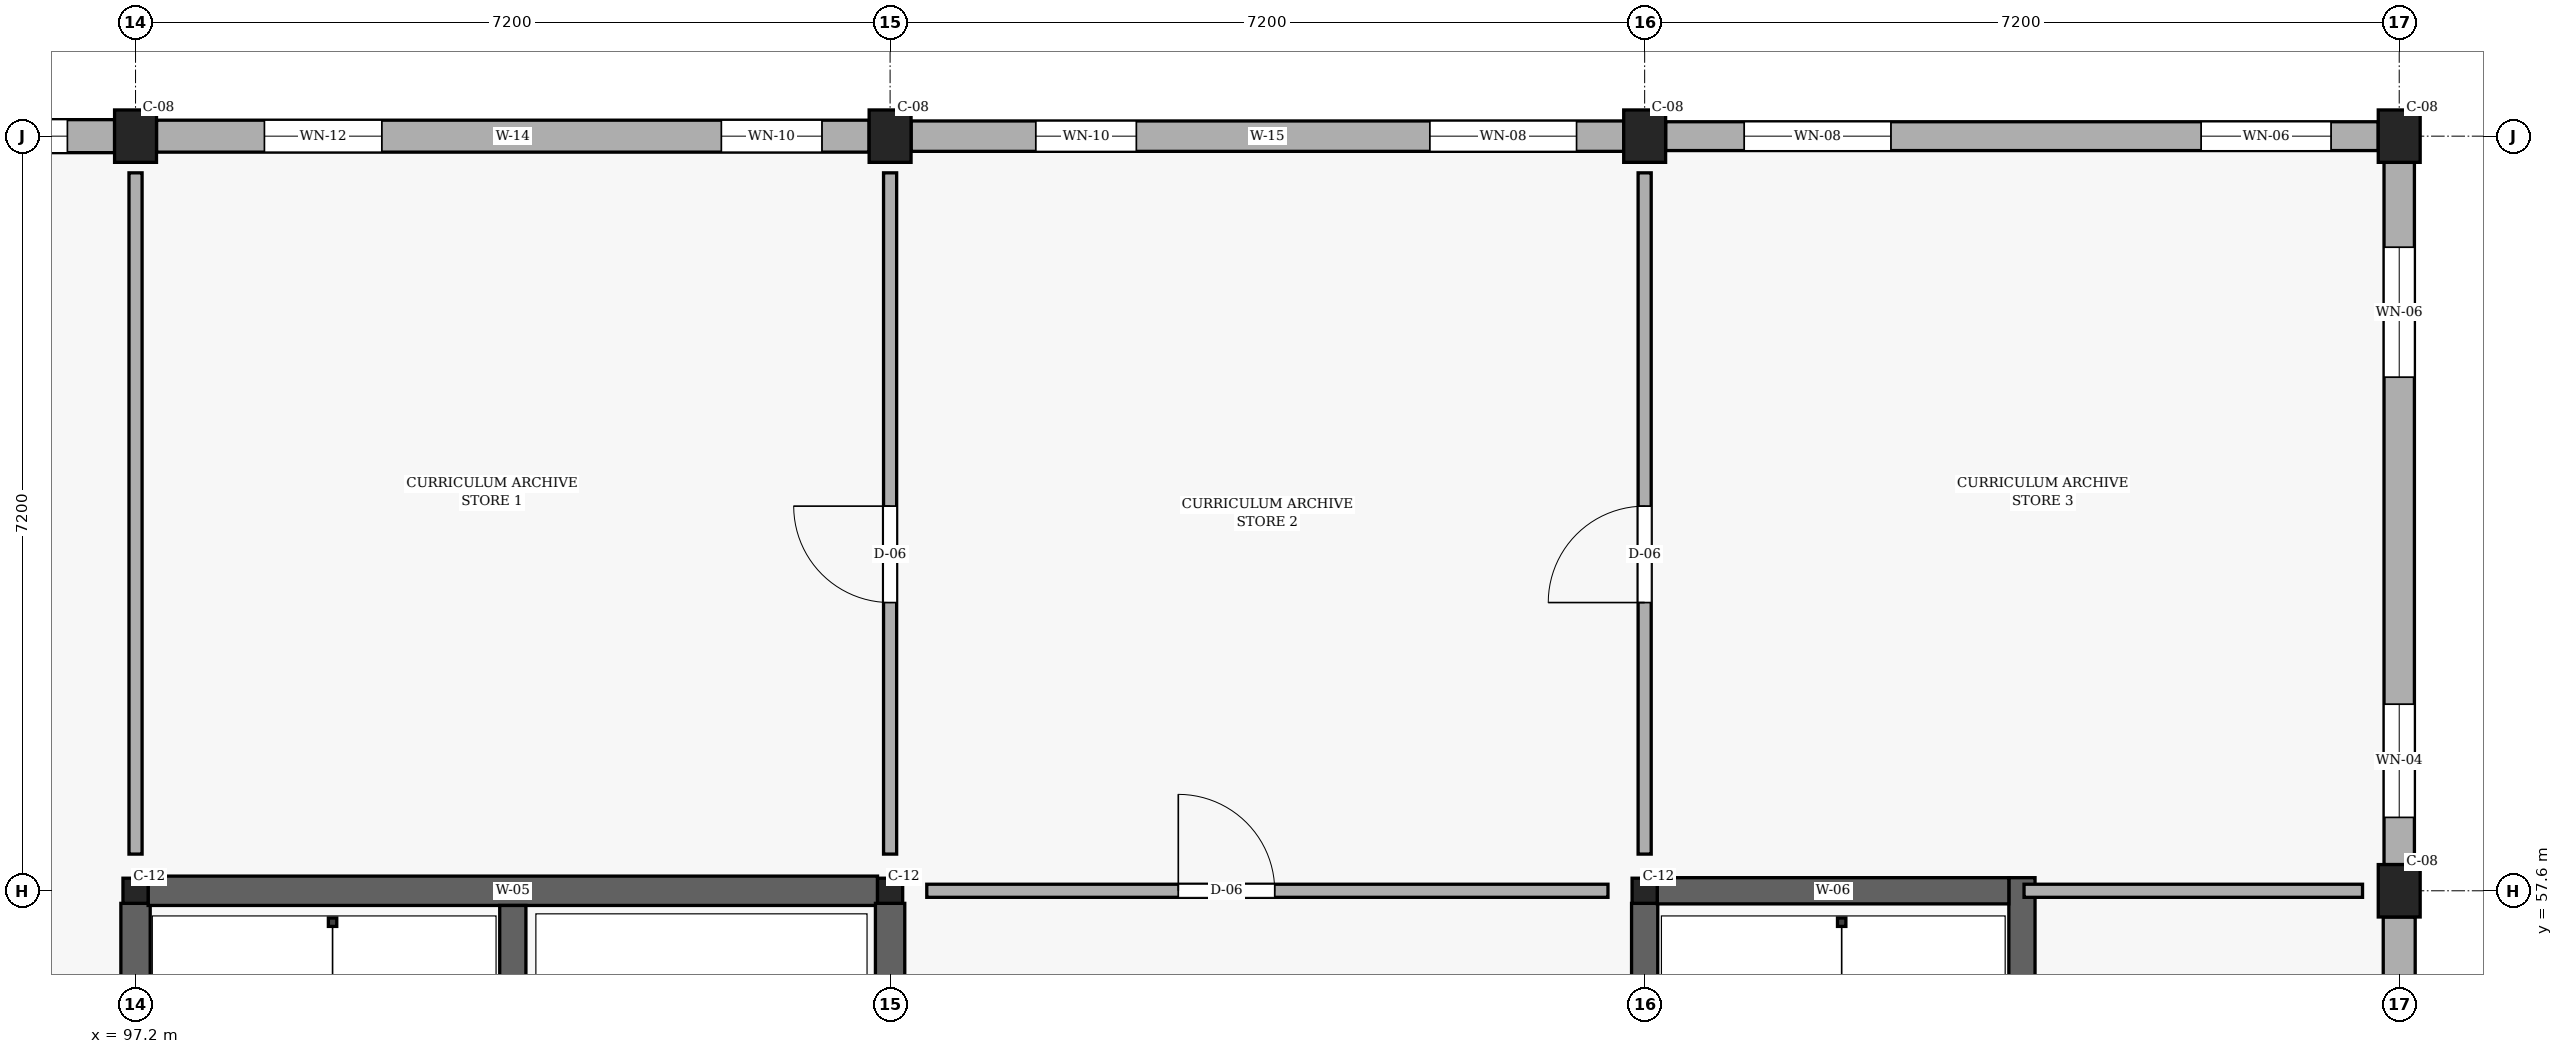
"""IFC4 building model, lengths in metres.
Left out: names, types, materials, properties, quantities, classifications, styles, units other than length and angle.
Written with IfcOpenShell. Run it as: python <this file> out.ifc"""

import sys

from ifc_helpers import new_model, si_unit, direction, frame, frame_2d, origin, origin_2d, place, context, subcontext, project, spatial, rectangle, i_section, extrude, element, fill, save


model = new_model("IFC4")
c1 = context("Model", 3, precision=1e-05, world=origin(), true_north=direction((0.0, 1.0)))
c2 = subcontext(c1, "Body", "Model", "MODEL_VIEW")
j1 = project(units=[si_unit("LENGTHUNIT", "METRE"), si_unit("PLANEANGLEUNIT", "RADIAN")], contexts=[c1])
p1 = place(None, origin())
s1 = spatial("IfcSite", under=j1, at=p1, CompositionType="ELEMENT")
p2 = place(p1, origin())
s2 = spatial("IfcBuilding", under=s1, at=p2, CompositionType="ELEMENT")
p3 = place(p2, frame((0.0, 0.0, 4.5)))
s3 = spatial("IfcBuildingStorey", under=s2, at=p3, CompositionType="ELEMENT", Elevation=4.5)
p4 = place(p3, frame((97.2, 57.6, 0.0), z_axis=(0.0, 0.0, 1.0), x_axis=(1.0, 0.0, 0.0)))
e1 = element("IfcColumn", 1, at=p4, inside=s3, PredefinedType="COLUMN", context=c2, shape_type="SweptSolid", body=[
    extrude(i_section(OverallWidth=0.24, OverallDepth=0.24, WebThickness=0.01, FlangeThickness=0.017, FilletRadius=0.021, at=origin_2d()), origin(), (0.0, 0.0, 1.0), 3.15),
])
p5 = place(p3, frame((97.2, 64.8, 0.0), z_axis=(0.0, 0.0, 1.0), x_axis=(1.0, 0.0, 0.0)))
e2 = element("IfcColumn", 2, at=p5, inside=s3, PredefinedType="COLUMN", context=c2, shape_type="SweptSolid", body=[
    extrude(rectangle(XDim=0.4, YDim=0.5, at=origin_2d()), origin(), (0.0, 0.0, 1.0), 3.15),
])
p6 = place(p3, frame((104.4, 57.6, 0.0), z_axis=(0.0, 0.0, 1.0), x_axis=(1.0, 0.0, 0.0)))
e3 = element("IfcColumn", 3, at=p6, inside=s3, PredefinedType="COLUMN", context=c2, shape_type="SweptSolid", body=[
    extrude(i_section(OverallWidth=0.24, OverallDepth=0.24, WebThickness=0.01, FlangeThickness=0.017, FilletRadius=0.021, at=origin_2d()), origin(), (0.0, 0.0, 1.0), 3.15),
])
p7 = place(p3, frame((104.4, 64.8, 0.0), z_axis=(0.0, 0.0, 1.0), x_axis=(1.0, 0.0, 0.0)))
e4 = element("IfcColumn", 4, at=p7, inside=s3, PredefinedType="COLUMN", context=c2, shape_type="SweptSolid", body=[
    extrude(rectangle(XDim=0.4, YDim=0.5, at=origin_2d()), origin(), (0.0, 0.0, 1.0), 3.15),
])
p8 = place(p3, frame((111.6, 57.6, 0.0), z_axis=(0.0, 0.0, 1.0), x_axis=(1.0, 0.0, 0.0)))
e5 = element("IfcColumn", 5, at=p8, inside=s3, PredefinedType="COLUMN", context=c2, shape_type="SweptSolid", body=[
    extrude(i_section(OverallWidth=0.24, OverallDepth=0.24, WebThickness=0.01, FlangeThickness=0.017, FilletRadius=0.021, at=origin_2d()), origin(), (0.0, 0.0, 1.0), 3.15),
])
for number, where, z_axis, x_axis in (
    (6, (111.6, 64.8, 0.0), (0.0, 0.0, 1.0), (1.0, 0.0, 0.0)),
    (7, (118.8, 57.6, 0.0), (0.0, 0.0, 1.0), (1.0, 0.0, 0.0)),
    (8, (118.8, 64.8, 0.0), (0.0, 0.0, 1.0), (1.0, 0.0, 0.0)),
):
    element("IfcColumn", number, at=place(p3, frame(where, z_axis=z_axis, x_axis=x_axis)), inside=s3, PredefinedType="COLUMN", context=c2, shape_type="SweptSolid", body=[
        extrude(rectangle(XDim=0.4, YDim=0.5, at=origin_2d()), origin(), (0.0, 0.0, 1.0), 3.15),
    ])
p9 = place(p3, frame((118.8, 50.65, 0.0), z_axis=(0.0, 0.0, 1.0), x_axis=(0.0, 1.0, 0.0)))
e9 = element("IfcWall", 9, at=p9, inside=s3, PredefinedType="SOLIDWALL", context=c2, shape_type="SweptSolid", body=[
    extrude(rectangle(XDim=6.7, YDim=0.305, at=frame_2d((3.35, 0.0))), origin(), (0.0, 0.0, 1.0), 2.34),
])
p10 = place(p9, frame((0.45, 0.0, 0.78)))
e10 = element("IfcOpeningElement", 10, at=p10, cuts=e9, PredefinedType="OPENING", context=c2, shape_type="SweptSolid", body=[
    extrude(rectangle(XDim=0.92, YDim=1.15, at=frame_2d((0.46, 0.575))), frame((0.0, 0.163, 0.0), z_axis=(0.0, -1.0, 0.0), x_axis=(1.0, 0.0, 0.0)), (0.0, 0.0, 1.0), 0.325),
])
p11 = place(p9, frame((4.65, 0.0, 0.78)))
e11 = element("IfcOpeningElement", 11, at=p11, cuts=e9, PredefinedType="OPENING", context=c2, shape_type="SweptSolid", body=[
    extrude(rectangle(XDim=1.08, YDim=1.15, at=frame_2d((0.54, 0.575))), frame((0.0, 0.163, 0.0), z_axis=(0.0, -1.0, 0.0), x_axis=(1.0, 0.0, 0.0)), (0.0, 0.0, 1.0), 0.325),
])
p12 = place(p3, frame((118.8, 57.85, 0.0), z_axis=(0.0, 0.0, 1.0), x_axis=(0.0, 1.0, 0.0)))
e12 = element("IfcWall", 12, at=p12, inside=s3, PredefinedType="SOLIDWALL", context=c2, shape_type="SweptSolid", body=[
    extrude(rectangle(XDim=6.7, YDim=0.29, at=frame_2d((3.35, 0.0))), origin(), (0.0, 0.0, 1.0), 2.34),
])
p13 = place(p12, frame((0.45, 0.0, 0.78)))
e13 = element("IfcOpeningElement", 13, at=p13, cuts=e12, PredefinedType="OPENING", context=c2, shape_type="SweptSolid", body=[
    extrude(rectangle(XDim=1.08, YDim=1.15, at=frame_2d((0.54, 0.575))), frame((0.0, 0.155, 0.0), z_axis=(0.0, -1.0, 0.0), x_axis=(1.0, 0.0, 0.0)), (0.0, 0.0, 1.0), 0.31),
])
p14 = place(p12, frame((4.65, 0.0, 0.78)))
e14 = element("IfcOpeningElement", 14, at=p14, cuts=e12, PredefinedType="OPENING", context=c2, shape_type="SweptSolid", body=[
    extrude(rectangle(XDim=1.24, YDim=1.15, at=frame_2d((0.62, 0.575))), frame((0.0, 0.155, 0.0), z_axis=(0.0, -1.0, 0.0), x_axis=(1.0, 0.0, 0.0)), (0.0, 0.0, 1.0), 0.31),
])
p15 = place(p3, frame((118.6, 64.8, 0.0), z_axis=(0.0, 0.0, 1.0), x_axis=(-1.0, 0.0, 0.0)))
e15 = element("IfcWall", 15, at=p15, inside=s3, PredefinedType="SOLIDWALL", context=c2, shape_type="SweptSolid", body=[
    extrude(rectangle(XDim=6.8, YDim=0.275, at=frame_2d((3.4, 0.0))), origin(), (0.0, 0.0, 1.0), 2.34),
])
p16 = place(p15, frame((0.45, 0.0, 0.78)))
e16 = element("IfcOpeningElement", 16, at=p16, cuts=e15, PredefinedType="OPENING", context=c2, shape_type="SweptSolid", body=[
    extrude(rectangle(XDim=1.24, YDim=1.15, at=frame_2d((0.62, 0.575))), frame((0.0, 0.147, 0.0), z_axis=(0.0, -1.0, 0.0), x_axis=(1.0, 0.0, 0.0)), (0.0, 0.0, 1.0), 0.295),
])
p17 = place(p15, frame((4.65, 0.0, 0.78)))
e17 = element("IfcOpeningElement", 17, at=p17, cuts=e15, PredefinedType="OPENING", context=c2, shape_type="SweptSolid", body=[
    extrude(rectangle(XDim=1.4, YDim=1.15, at=frame_2d((0.7, 0.575))), frame((0.0, 0.147, 0.0), z_axis=(0.0, -1.0, 0.0), x_axis=(1.0, 0.0, 0.0)), (0.0, 0.0, 1.0), 0.295),
])
p18 = place(p3, frame((111.4, 64.8, 0.0), z_axis=(0.0, 0.0, 1.0), x_axis=(-1.0, 0.0, 0.0)))
e18 = element("IfcWall", 18, at=p18, inside=s3, PredefinedType="SOLIDWALL", context=c2, shape_type="SweptSolid", body=[
    extrude(rectangle(XDim=6.8, YDim=0.29, at=frame_2d((3.4, 0.0))), origin(), (0.0, 0.0, 1.0), 2.34),
])
p19 = place(p18, frame((0.45, 0.0, 0.78)))
e19 = element("IfcOpeningElement", 19, at=p19, cuts=e18, PredefinedType="OPENING", context=c2, shape_type="SweptSolid", body=[
    extrude(rectangle(XDim=1.4, YDim=1.15, at=frame_2d((0.7, 0.575))), frame((0.0, 0.155, 0.0), z_axis=(0.0, -1.0, 0.0), x_axis=(1.0, 0.0, 0.0)), (0.0, 0.0, 1.0), 0.31),
])
p20 = place(p18, frame((4.65, 0.0, 0.78)))
e20 = element("IfcOpeningElement", 20, at=p20, cuts=e18, PredefinedType="OPENING", context=c2, shape_type="SweptSolid", body=[
    extrude(rectangle(XDim=0.96, YDim=1.26, at=frame_2d((0.48, 0.63))), frame((0.0, 0.155, 0.0), z_axis=(0.0, -1.0, 0.0), x_axis=(1.0, 0.0, 0.0)), (0.0, 0.0, 1.0), 0.31),
])
p21 = place(p3, frame((104.2, 64.8, 0.0), z_axis=(0.0, 0.0, 1.0), x_axis=(-1.0, 0.0, 0.0)))
e21 = element("IfcWall", 21, at=p21, inside=s3, PredefinedType="SOLIDWALL", context=c2, shape_type="SweptSolid", body=[
    extrude(rectangle(XDim=6.8, YDim=0.305, at=frame_2d((3.4, 0.0))), origin(), (0.0, 0.0, 1.0), 2.34),
])
p22 = place(p21, frame((0.45, 0.0, 0.78)))
e22 = element("IfcOpeningElement", 22, at=p22, cuts=e21, PredefinedType="OPENING", context=c2, shape_type="SweptSolid", body=[
    extrude(rectangle(XDim=0.96, YDim=1.26, at=frame_2d((0.48, 0.63))), frame((0.0, 0.163, 0.0), z_axis=(0.0, -1.0, 0.0), x_axis=(1.0, 0.0, 0.0)), (0.0, 0.0, 1.0), 0.325),
])
p23 = place(p21, frame((4.65, 0.0, 0.78)))
e23 = element("IfcOpeningElement", 23, at=p23, cuts=e21, PredefinedType="OPENING", context=c2, shape_type="SweptSolid", body=[
    extrude(rectangle(XDim=1.12, YDim=1.26, at=frame_2d((0.56, 0.63))), frame((0.0, 0.163, 0.0), z_axis=(0.0, -1.0, 0.0), x_axis=(1.0, 0.0, 0.0)), (0.0, 0.0, 1.0), 0.325),
])
p24 = place(p3, frame((97.0, 64.8, 0.0), z_axis=(0.0, 0.0, 1.0), x_axis=(-1.0, 0.0, 0.0)))
e24 = element("IfcWall", 24, at=p24, inside=s3, PredefinedType="SOLIDWALL", context=c2, shape_type="SweptSolid", body=[
    extrude(rectangle(XDim=6.8, YDim=0.315, at=frame_2d((3.4, 0.0))), origin(), (0.0, 0.0, 1.0), 2.34),
])
p25 = place(p24, frame((0.45, 0.0, 0.78)))
e25 = element("IfcOpeningElement", 25, at=p25, cuts=e24, PredefinedType="OPENING", context=c2, shape_type="SweptSolid", body=[
    extrude(rectangle(XDim=1.12, YDim=1.26, at=frame_2d((0.56, 0.63))), frame((0.0, 0.167, 0.0), z_axis=(0.0, -1.0, 0.0), x_axis=(1.0, 0.0, 0.0)), (0.0, 0.0, 1.0), 0.335),
])
p26 = place(p24, frame((4.65, 0.0, 0.78)))
e26 = element("IfcOpeningElement", 26, at=p26, cuts=e24, PredefinedType="OPENING", context=c2, shape_type="SweptSolid", body=[
    extrude(rectangle(XDim=1.28, YDim=1.26, at=frame_2d((0.64, 0.63))), frame((0.0, 0.167, 0.0), z_axis=(0.0, -1.0, 0.0), x_axis=(1.0, 0.0, 0.0)), (0.0, 0.0, 1.0), 0.335),
])
for number, where, z_axis, x_axis in (
    (27, (97.2, 50.52, 0.0), (0.0, 0.0, 1.0), (0.0, 1.0, 0.0)),
    (28, (97.32, 57.6, 0.0), (0.0, 0.0, 1.0), (1.0, 0.0, 0.0)),
    (29, (104.4, 50.52, 0.0), (0.0, 0.0, 1.0), (0.0, 1.0, 0.0)),
):
    element("IfcWall", number, at=place(p3, frame(where, z_axis=z_axis, x_axis=x_axis)), inside=s3, PredefinedType="SHEAR", context=c2, shape_type="SweptSolid", body=[
        extrude(rectangle(XDim=6.96, YDim=0.28, at=frame_2d((3.48, 0.0))), origin(), (0.0, 0.0, 1.0), 2.89),
    ])
p27 = place(p3, frame((100.8, 50.54, 0.0), z_axis=(0.0, 0.0, 1.0), x_axis=(0.0, 1.0, 0.0)))
e30 = element("IfcWall", 30, at=p27, inside=s3, PredefinedType="SHEAR", context=c2, shape_type="SweptSolid", body=[
    extrude(rectangle(XDim=6.92, YDim=0.25, at=frame_2d((3.46, 0.0))), origin(), (0.0, 0.0, 1.0), 2.89),
])
p28 = place(p27, frame((0.46, 0.0, 0.0)))
e31 = element("IfcOpeningElement", 31, at=p28, cuts=e30, PredefinedType="OPENING", context=c2, shape_type="SweptSolid", body=[
    extrude(rectangle(XDim=1.05, YDim=2.15, at=frame_2d((0.525, 1.075))), frame((0.0, 0.135, 0.0), z_axis=(0.0, -1.0, 0.0), x_axis=(1.0, 0.0, 0.0)), (0.0, 0.0, 1.0), 0.27),
])
p29 = place(p3, frame((111.6, 50.52, 0.0), z_axis=(0.0, 0.0, 1.0), x_axis=(0.0, 1.0, 0.0)))
e32 = element("IfcWall", 32, at=p29, inside=s3, PredefinedType="SHEAR", context=c2, shape_type="SweptSolid", body=[
    extrude(rectangle(XDim=6.96, YDim=0.25, at=frame_2d((3.48, 0.0))), origin(), (0.0, 0.0, 1.0), 2.89),
])
p30 = place(p3, frame((115.2, 50.275, 0.0), z_axis=(0.0, 0.0, 1.0), x_axis=(0.0, 1.0, 0.0)))
e33 = element("IfcWall", 33, at=p30, inside=s3, PredefinedType="SHEAR", context=c2, shape_type="SweptSolid", body=[
    extrude(rectangle(XDim=7.45, YDim=0.25, at=frame_2d((3.725, 0.0))), origin(), (0.0, 0.0, 1.0), 2.89),
])
p31 = place(p3, frame((111.72, 57.6, 0.0), z_axis=(0.0, 0.0, 1.0), x_axis=(1.0, 0.0, 0.0)))
e34 = element("IfcWall", 34, at=p31, inside=s3, PredefinedType="SHEAR", context=c2, shape_type="SweptSolid", body=[
    extrude(rectangle(XDim=3.355, YDim=0.25, at=frame_2d((1.677, 0.0))), origin(), (0.0, 0.0, 1.0), 2.89),
])
p32 = place(p3, frame((104.75, 57.6, 0.0), z_axis=(0.0, 0.0, 1.0), x_axis=(1.0, 0.0, 0.0)))
e35 = element("IfcWall", 35, at=p32, inside=s3, PredefinedType="PARTITIONING", context=c2, shape_type="SweptSolid", body=[
    extrude(rectangle(XDim=6.5, YDim=0.125, at=frame_2d((3.25, 0.0))), origin(), (0.0, 0.0, 1.0), 2.29),
])
p33 = place(p32, frame((2.4, 0.0, 0.0)))
e36 = element("IfcOpeningElement", 36, at=p33, cuts=e35, PredefinedType="OPENING", context=c2, shape_type="SweptSolid", body=[
    extrude(rectangle(XDim=0.92, YDim=2.1, at=frame_2d((0.46, 1.05))), frame((0.0, 0.073, 0.0), z_axis=(0.0, -1.0, 0.0), x_axis=(1.0, 0.0, 0.0)), (0.0, 0.0, 1.0), 0.145),
])
p34 = place(p3, frame((115.22, 57.6, 0.0), z_axis=(0.0, 0.0, 1.0), x_axis=(1.0, 0.0, 0.0)))
e37 = element("IfcWall", 37, at=p34, inside=s3, PredefinedType="PARTITIONING", context=c2, shape_type="SweptSolid", body=[
    extrude(rectangle(XDim=3.23, YDim=0.125, at=frame_2d((1.615, 0.0))), origin(), (0.0, 0.0, 1.0), 2.29),
])
p35 = place(p3, frame((97.2, 57.95, 0.0), z_axis=(0.0, 0.0, 1.0), x_axis=(0.0, 1.0, 0.0)))
e38 = element("IfcWall", 38, at=p35, inside=s3, PredefinedType="PARTITIONING", context=c2, shape_type="SweptSolid", body=[
    extrude(rectangle(XDim=6.5, YDim=0.125, at=frame_2d((3.25, 0.0))), origin(), (0.0, 0.0, 1.0), 2.29),
])
p36 = place(p3, frame((104.4, 57.95, 0.0), z_axis=(0.0, 0.0, 1.0), x_axis=(0.0, 1.0, 0.0)))
e39 = element("IfcWall", 39, at=p36, inside=s3, PredefinedType="PARTITIONING", context=c2, shape_type="SweptSolid", body=[
    extrude(rectangle(XDim=6.5, YDim=0.125, at=frame_2d((3.25, 0.0))), origin(), (0.0, 0.0, 1.0), 2.29),
])
p37 = place(p36, frame((2.4, 0.0, 0.0)))
e40 = element("IfcOpeningElement", 40, at=p37, cuts=e39, PredefinedType="OPENING", context=c2, shape_type="SweptSolid", body=[
    extrude(rectangle(XDim=0.92, YDim=2.1, at=frame_2d((0.46, 1.05))), frame((0.0, 0.073, 0.0), z_axis=(0.0, -1.0, 0.0), x_axis=(1.0, 0.0, 0.0)), (0.0, 0.0, 1.0), 0.145),
])
p38 = place(p3, frame((111.6, 57.95, 0.0), z_axis=(0.0, 0.0, 1.0), x_axis=(0.0, 1.0, 0.0)))
e41 = element("IfcWall", 41, at=p38, inside=s3, PredefinedType="PARTITIONING", context=c2, shape_type="SweptSolid", body=[
    extrude(rectangle(XDim=6.5, YDim=0.125, at=frame_2d((3.25, 0.0))), origin(), (0.0, 0.0, 1.0), 2.29),
])
p39 = place(p38, frame((2.4, 0.0, 0.0)))
e42 = element("IfcOpeningElement", 42, at=p39, cuts=e41, PredefinedType="OPENING", context=c2, shape_type="SweptSolid", body=[
    extrude(rectangle(XDim=0.92, YDim=2.1, at=frame_2d((0.46, 1.05))), frame((0.0, 0.073, 0.0), z_axis=(0.0, -1.0, 0.0), x_axis=(1.0, 0.0, 0.0)), (0.0, 0.0, 1.0), 0.145),
])
p40 = place(p13, origin())
e43 = element("IfcWindow", 43, at=p40, inside=s3, PartitioningType="SINGLE_PANEL", PredefinedType="WINDOW", context=c2, shape_type="SweptSolid", body=[
    extrude(rectangle(XDim=1.08, YDim=1.15, at=frame_2d((0.54, 0.575))), frame((0.0, 0.03, 0.0), z_axis=(0.0, -1.0, 0.0), x_axis=(1.0, 0.0, 0.0)), (0.0, 0.0, 1.0), 0.06),
])
fill(e13, e43)
p41 = place(p14, origin())
e44 = element("IfcWindow", 44, at=p41, inside=s3, PartitioningType="SINGLE_PANEL", PredefinedType="WINDOW", context=c2, shape_type="SweptSolid", body=[
    extrude(rectangle(XDim=1.24, YDim=1.15, at=frame_2d((0.62, 0.575))), frame((0.0, 0.03, 0.0), z_axis=(0.0, -1.0, 0.0), x_axis=(1.0, 0.0, 0.0)), (0.0, 0.0, 1.0), 0.06),
])
fill(e14, e44)
p42 = place(p16, origin())
e45 = element("IfcWindow", 45, at=p42, inside=s3, PartitioningType="SINGLE_PANEL", PredefinedType="WINDOW", context=c2, shape_type="SweptSolid", body=[
    extrude(rectangle(XDim=1.24, YDim=1.15, at=frame_2d((0.62, 0.575))), frame((0.0, 0.03, 0.0), z_axis=(0.0, -1.0, 0.0), x_axis=(1.0, 0.0, 0.0)), (0.0, 0.0, 1.0), 0.06),
])
fill(e16, e45)
p43 = place(p17, origin())
e46 = element("IfcWindow", 46, at=p43, inside=s3, PartitioningType="SINGLE_PANEL", PredefinedType="WINDOW", context=c2, shape_type="SweptSolid", body=[
    extrude(rectangle(XDim=1.4, YDim=1.15, at=frame_2d((0.7, 0.575))), frame((0.0, 0.03, 0.0), z_axis=(0.0, -1.0, 0.0), x_axis=(1.0, 0.0, 0.0)), (0.0, 0.0, 1.0), 0.06),
])
fill(e17, e46)
p44 = place(p19, origin())
e47 = element("IfcWindow", 47, at=p44, inside=s3, PartitioningType="SINGLE_PANEL", PredefinedType="WINDOW", context=c2, shape_type="SweptSolid", body=[
    extrude(rectangle(XDim=1.4, YDim=1.15, at=frame_2d((0.7, 0.575))), frame((0.0, 0.03, 0.0), z_axis=(0.0, -1.0, 0.0), x_axis=(1.0, 0.0, 0.0)), (0.0, 0.0, 1.0), 0.06),
])
fill(e19, e47)
p45 = place(p20, origin())
e48 = element("IfcWindow", 48, at=p45, inside=s3, PartitioningType="SINGLE_PANEL", PredefinedType="WINDOW", context=c2, shape_type="SweptSolid", body=[
    extrude(rectangle(XDim=0.96, YDim=1.26, at=frame_2d((0.48, 0.63))), frame((0.0, 0.03, 0.0), z_axis=(0.0, -1.0, 0.0), x_axis=(1.0, 0.0, 0.0)), (0.0, 0.0, 1.0), 0.06),
])
fill(e20, e48)
p46 = place(p22, origin())
e49 = element("IfcWindow", 49, at=p46, inside=s3, PartitioningType="SINGLE_PANEL", PredefinedType="WINDOW", context=c2, shape_type="SweptSolid", body=[
    extrude(rectangle(XDim=0.96, YDim=1.26, at=frame_2d((0.48, 0.63))), frame((0.0, 0.03, 0.0), z_axis=(0.0, -1.0, 0.0), x_axis=(1.0, 0.0, 0.0)), (0.0, 0.0, 1.0), 0.06),
])
fill(e22, e49)
p47 = place(p23, origin())
e50 = element("IfcWindow", 50, at=p47, inside=s3, PartitioningType="SINGLE_PANEL", PredefinedType="WINDOW", context=c2, shape_type="SweptSolid", body=[
    extrude(rectangle(XDim=1.12, YDim=1.26, at=frame_2d((0.56, 0.63))), frame((0.0, 0.03, 0.0), z_axis=(0.0, -1.0, 0.0), x_axis=(1.0, 0.0, 0.0)), (0.0, 0.0, 1.0), 0.06),
])
fill(e23, e50)
p48 = place(p25, origin())
e51 = element("IfcWindow", 51, at=p48, inside=s3, PartitioningType="SINGLE_PANEL", PredefinedType="WINDOW", context=c2, shape_type="SweptSolid", body=[
    extrude(rectangle(XDim=1.12, YDim=1.26, at=frame_2d((0.56, 0.63))), frame((0.0, 0.03, 0.0), z_axis=(0.0, -1.0, 0.0), x_axis=(1.0, 0.0, 0.0)), (0.0, 0.0, 1.0), 0.06),
])
fill(e25, e51)
p49 = place(p33, origin())
e52 = element("IfcDoor", 52, at=p49, inside=s3, OperationType="SINGLE_SWING_LEFT", PredefinedType="DOOR", context=c2, shape_type="SweptSolid", body=[
    extrude(rectangle(XDim=0.92, YDim=2.1, at=frame_2d((0.46, 1.05))), frame((0.0, 0.025, 0.0), z_axis=(0.0, -1.0, 0.0), x_axis=(1.0, 0.0, 0.0)), (0.0, 0.0, 1.0), 0.05),
])
fill(e36, e52)
p50 = place(p37, origin())
e53 = element("IfcDoor", 53, at=p50, inside=s3, OperationType="SINGLE_SWING_RIGHT", PredefinedType="DOOR", context=c2, shape_type="SweptSolid", body=[
    extrude(rectangle(XDim=0.92, YDim=2.1, at=frame_2d((0.46, 1.05))), frame((0.0, 0.025, 0.0), z_axis=(0.0, -1.0, 0.0), x_axis=(1.0, 0.0, 0.0)), (0.0, 0.0, 1.0), 0.05),
])
fill(e40, e53)
p51 = place(p39, origin())
e54 = element("IfcDoor", 54, at=p51, inside=s3, OperationType="SINGLE_SWING_LEFT", PredefinedType="DOOR", context=c2, shape_type="SweptSolid", body=[
    extrude(rectangle(XDim=0.92, YDim=2.1, at=frame_2d((0.46, 1.05))), frame((0.0, 0.025, 0.0), z_axis=(0.0, -1.0, 0.0), x_axis=(1.0, 0.0, 0.0)), (0.0, 0.0, 1.0), 0.05),
])
fill(e42, e54)
save(model, sys.argv[1])
